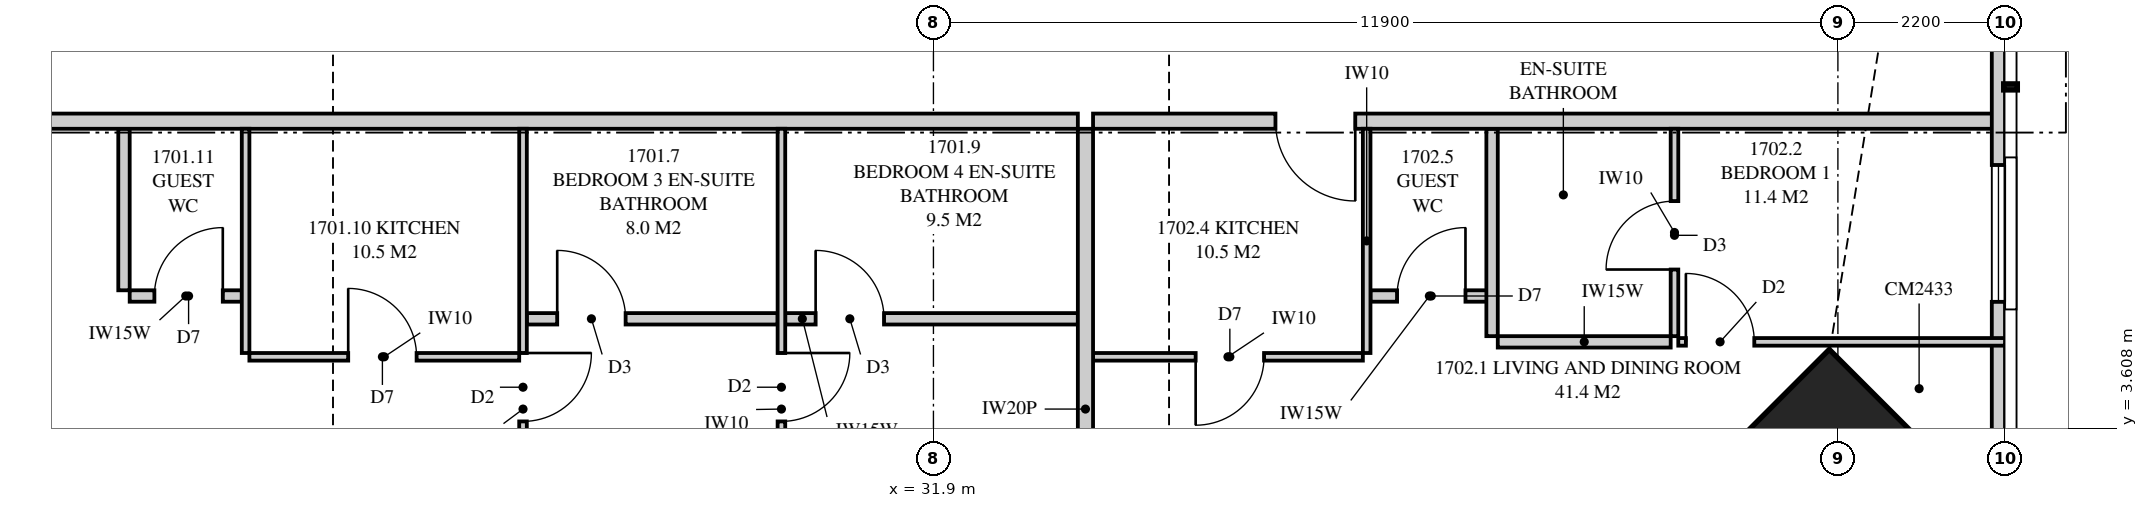
"""IFC4 building model, lengths in metres.
Left out: names, types, materials, properties, quantities, classifications, styles, units other than length and angle.
Written with IfcOpenShell. Run it as: python <this file> out.ifc"""

import sys

from ifc_helpers import new_model, si_unit, direction, frame, frame_2d, origin, origin_2d, place, context, subcontext, project, spatial, polyline, rectangle, outline, extrude, element, fill, save


model = new_model("IFC4")
c1 = context("Model", 3, precision=1e-05, world=origin(), true_north=direction((0.0, 1.0)))
c2 = subcontext(c1, "Body", "Model", "MODEL_VIEW")
j1 = project(units=[si_unit("LENGTHUNIT", "METRE"), si_unit("PLANEANGLEUNIT", "RADIAN")], contexts=[c1])
p1 = place(None, origin())
s1 = spatial("IfcSite", under=j1, at=p1, CompositionType="ELEMENT")
p2 = place(p1, origin())
s2 = spatial("IfcBuilding", under=s1, at=p2, CompositionType="ELEMENT")
p3 = place(p2, frame((0.0, 0.0, 64.55)))
s3 = spatial("IfcBuildingStorey", under=s2, at=p3, CompositionType="ELEMENT", Elevation=64.55)
p4 = place(p3, frame((43.369, 2.631, 0.0), z_axis=(0.0, 0.0, 1.0), x_axis=(-0.707106781187, 0.707106781187, 0.0)))
e1 = element("IfcColumn", 1, at=p4, inside=s3, PredefinedType="COLUMN", context=c2, shape_type="SweptSolid", body=[
    extrude(rectangle(XDim=2.4, YDim=3.3, at=origin_2d()), origin(), (0.0, 0.0, 1.0), 3.35),
])
p5 = place(p3, frame((45.913, 3.051, 0.0), z_axis=(0.0, 0.0, 1.0), x_axis=(0.0, 1.0, 0.0)))
e2 = element("IfcWall", 2, at=p5, inside=s3, PredefinedType="SOLIDWALL", context=c2, shape_type="SweptSolid", body=[
    extrude(outline(polyline([(0.0, 0.0), (31.897, 0.0), (31.897, 3.11), (22.167, 3.11), (22.167, 2.15), (22.074, 2.15), (22.074, 3.11), (21.949, 3.11), (21.949, 2.15), (9.949, 2.15), (9.949, 3.11), (9.823, 3.11), (9.823, 2.15), (9.73, 2.15), (9.73, 3.11), (0.0, 3.11), (0.0, 0.0)])), frame((0.0, 0.087, 0.0), z_axis=(0.0, -1.0, 0.0), x_axis=(1.0, 0.0, 0.0)), (0.0, 0.0, 1.0), 0.175),
])
p6 = place(p5, frame((2.222, 0.0, 0.4)))
e3 = element("IfcOpeningElement", 3, at=p6, cuts=e2, PredefinedType="OPENING", context=c2, shape_type="SweptSolid", body=[
    extrude(rectangle(XDim=1.8, YDim=1.7, at=frame_2d((0.9, 0.85))), frame((0.0, 0.097, 0.0), z_axis=(0.0, -1.0, 0.0), x_axis=(1.0, 0.0, 0.0)), (0.0, 0.0, 1.0), 0.195),
])
p7 = place(p5, frame((14.849, 0.0, 0.4)))
e4 = element("IfcOpeningElement", 4, at=p7, cuts=e2, PredefinedType="OPENING", context=c2, shape_type="SweptSolid", body=[
    extrude(rectangle(XDim=1.2, YDim=1.7, at=frame_2d((0.6, 0.85))), frame((0.0, 0.097, 0.0), z_axis=(0.0, -1.0, 0.0), x_axis=(1.0, 0.0, 0.0)), (0.0, 0.0, 1.0), 0.195),
])
p8 = place(p5, frame((27.375, 0.0, 0.4)))
e5 = element("IfcOpeningElement", 5, at=p8, cuts=e2, PredefinedType="OPENING", context=c2, shape_type="SweptSolid", body=[
    extrude(rectangle(XDim=1.8, YDim=1.7, at=frame_2d((0.9, 0.85))), frame((0.0, 0.097, 0.0), z_axis=(0.0, -1.0, 0.0), x_axis=(1.0, 0.0, 0.0)), (0.0, 0.0, 1.0), 0.195),
])
p9 = place(p3, frame((33.9, 0.175, 0.0), z_axis=(0.0, 0.0, 1.0), x_axis=(0.0, 1.0, 0.0)))
e6 = element("IfcWall", 6, at=p9, inside=s3, PredefinedType="PARTITIONING", context=c2, shape_type="SweptSolid", body=[
    extrude(outline(polyline([(0.529, 2.15), (0.0, 2.15), (0.0, 0.0), (0.529, 0.0), (0.529, 0.752), (1.021, 0.752), (1.021, 0.0), (7.375, 0.0), (7.375, 3.11), (1.685, 3.11), (1.685, 2.15), (1.021, 2.15), (1.021, 1.398), (0.529, 1.398), (0.529, 2.15)])), frame((0.0, 0.1, 0.0), z_axis=(0.0, -1.0, 0.0), x_axis=(1.0, 0.0, 0.0)), (0.0, 0.0, 1.0), 0.2),
])
p10 = place(p3, frame((17.725, 7.65, 0.0), z_axis=(0.0, 0.0, 1.0), x_axis=(1.0, 0.0, 0.0)))
e7 = element("IfcWall", 7, at=p10, inside=s3, PredefinedType="PARTITIONING", context=c2, shape_type="SweptSolid", body=[
    extrude(outline(polyline([(0.0, 0.0), (16.075, 0.0), (16.075, 3.11), (6.612, 3.11), (6.612, 2.541), (5.938, 2.541), (5.938, 3.11), (0.0, 3.11), (0.0, 0.0)])), frame((0.0, 0.1, 0.0), z_axis=(0.0, -1.0, 0.0), x_axis=(1.0, 0.0, 0.0)), (0.0, 0.0, 1.0), 0.2),
])
p11 = place(p10, frame((0.2, 0.0, 0.0)))
e8 = element("IfcOpeningElement", 8, at=p11, cuts=e7, PredefinedType="OPENING", context=c2, shape_type="SweptSolid", body=[
    extrude(rectangle(XDim=1.05, YDim=2.2, at=frame_2d((0.525, 1.1))), frame((0.0, 0.11, 0.0), z_axis=(0.0, -1.0, 0.0), x_axis=(1.0, 0.0, 0.0)), (0.0, 0.0, 1.0), 0.22),
])
p12 = place(p3, frame((26.5, 0.175, 0.0), z_axis=(0.0, 0.0, 1.0), x_axis=(0.0, 1.0, 0.0)))
e9 = element("IfcWall", 9, at=p12, inside=s3, PredefinedType="PARTITIONING", context=c2, shape_type="SweptSolid", body=[
    extrude(outline(polyline([(0.0, 0.0), (7.375, 0.0), (7.375, 3.11), (1.635, 3.11), (1.635, 2.15), (0.0, 2.15), (0.0, 3.11), (0.0, 0.0)])), frame((0.0, 0.05, 0.0), z_axis=(0.0, -1.0, 0.0), x_axis=(1.0, 0.0, 0.0)), (0.0, 0.0, 1.0), 0.1),
])
p13 = place(p12, frame((3.525, 0.0, 0.0)))
e10 = element("IfcOpeningElement", 10, at=p13, cuts=e9, PredefinedType="OPENING", context=c2, shape_type="SweptSolid", body=[
    extrude(rectangle(XDim=0.9, YDim=2.1, at=frame_2d((0.45, 1.05))), frame((0.0, 0.06, 0.0), z_axis=(0.0, -1.0, 0.0), x_axis=(1.0, 0.0, 0.0)), (0.0, 0.0, 1.0), 0.12),
])
p14 = place(p3, frame((29.9, 0.175, 0.0), z_axis=(0.0, 0.0, 1.0), x_axis=(0.0, 1.0, 0.0)))
e11 = element("IfcWall", 11, at=p14, inside=s3, PredefinedType="PARTITIONING", context=c2, shape_type="SweptSolid", body=[
    extrude(outline(polyline([(0.0, 0.0), (7.375, 0.0), (7.375, 3.11), (1.635, 3.11), (1.635, 2.15), (0.0, 2.15), (0.0, 3.11), (0.0, 0.0)])), frame((0.0, 0.05, 0.0), z_axis=(0.0, -1.0, 0.0), x_axis=(1.0, 0.0, 0.0)), (0.0, 0.0, 1.0), 0.1),
])
p15 = place(p14, frame((3.525, 0.0, 0.0)))
e12 = element("IfcOpeningElement", 12, at=p15, cuts=e11, PredefinedType="OPENING", context=c2, shape_type="SweptSolid", body=[
    extrude(rectangle(XDim=0.9, YDim=2.1, at=frame_2d((0.45, 1.05))), frame((0.0, 0.06, 0.0), z_axis=(0.0, -1.0, 0.0), x_axis=(1.0, 0.0, 0.0)), (0.0, 0.0, 1.0), 0.12),
])
p16 = place(p3, frame((26.55, 5.05, 0.0), z_axis=(0.0, 0.0, 1.0), x_axis=(1.0, 0.0, 0.0)))
e13 = element("IfcWall", 13, at=p16, inside=s3, PredefinedType="PLUMBINGWALL", context=c2, shape_type="SweptSolid", body=[
    extrude(rectangle(XDim=3.3, YDim=0.15, at=frame_2d((1.65, 0.0))), origin(), (0.0, 0.0, 1.0), 3.11),
])
p17 = place(p16, frame((0.4, 0.0, 0.0)))
e14 = element("IfcOpeningElement", 14, at=p17, cuts=e13, PredefinedType="OPENING", context=c2, shape_type="SweptSolid", body=[
    extrude(rectangle(XDim=0.9, YDim=2.1, at=frame_2d((0.45, 1.05))), frame((0.0, 0.085, 0.0), z_axis=(0.0, -1.0, 0.0), x_axis=(1.0, 0.0, 0.0)), (0.0, 0.0, 1.0), 0.17),
])
p18 = place(p3, frame((29.95, 5.05, 0.0), z_axis=(0.0, 0.0, 1.0), x_axis=(1.0, 0.0, 0.0)))
e15 = element("IfcWall", 15, at=p18, inside=s3, PredefinedType="PLUMBINGWALL", context=c2, shape_type="SweptSolid", body=[
    extrude(rectangle(XDim=3.85, YDim=0.15, at=frame_2d((1.925, 0.0))), origin(), (0.0, 0.0, 1.0), 3.11),
])
p19 = place(p18, frame((0.4, 0.0, 0.0)))
e16 = element("IfcOpeningElement", 16, at=p19, cuts=e15, PredefinedType="OPENING", context=c2, shape_type="SweptSolid", body=[
    extrude(rectangle(XDim=0.9, YDim=2.1, at=frame_2d((0.45, 1.05))), frame((0.0, 0.085, 0.0), z_axis=(0.0, -1.0, 0.0), x_axis=(1.0, 0.0, 0.0)), (0.0, 0.0, 1.0), 0.17),
])
p20 = place(p3, frame((22.9, 4.55, 0.0), z_axis=(0.0, 0.0, 1.0), x_axis=(1.0, 0.0, 0.0)))
e17 = element("IfcWall", 17, at=p20, inside=s3, PredefinedType="PARTITIONING", context=c2, shape_type="SweptSolid", body=[
    extrude(outline(polyline([(0.0, 0.0), (3.55, 0.0), (3.55, 3.11), (1.387, 3.11), (1.387, 2.541), (0.812, 2.541), (0.812, 3.11), (0.0, 3.11), (0.0, 0.0)])), frame((0.0, 0.05, 0.0), z_axis=(0.0, -1.0, 0.0), x_axis=(1.0, 0.0, 0.0)), (0.0, 0.0, 1.0), 0.1),
])
p21 = place(p20, frame((1.3, 0.0, 0.0)))
e18 = element("IfcOpeningElement", 18, at=p21, cuts=e17, PredefinedType="OPENING", context=c2, shape_type="SweptSolid", body=[
    extrude(rectangle(XDim=0.9, YDim=2.1, at=frame_2d((0.45, 1.05))), frame((0.0, 0.06, 0.0), z_axis=(0.0, -1.0, 0.0), x_axis=(1.0, 0.0, 0.0)), (0.0, 0.0, 1.0), 0.12),
])
p22 = place(p3, frame((22.85, 4.6, 0.0), z_axis=(0.0, 0.0, 1.0), x_axis=(0.0, 1.0, 0.0)))
e19 = element("IfcWall", 19, at=p22, inside=s3, PredefinedType="PARTITIONING", context=c2, shape_type="SweptSolid", body=[
    extrude(rectangle(XDim=2.95, YDim=0.1, at=frame_2d((1.475, 0.0))), origin(), (0.0, 0.0, 1.0), 3.11),
])
p23 = place(p3, frame((21.325, 5.35, 0.0), z_axis=(0.0, 0.0, 1.0), x_axis=(1.0, 0.0, 0.0)))
e20 = element("IfcWall", 20, at=p23, inside=s3, PredefinedType="PLUMBINGWALL", context=c2, shape_type="SweptSolid", body=[
    extrude(rectangle(XDim=1.475, YDim=0.15, at=frame_2d((0.738, 0.0))), origin(), (0.0, 0.0, 1.0), 3.11),
])
p24 = place(p23, frame((0.325, 0.0, 0.0)))
e21 = element("IfcOpeningElement", 21, at=p24, cuts=e20, PredefinedType="OPENING", context=c2, shape_type="SweptSolid", body=[
    extrude(rectangle(XDim=0.9, YDim=2.1, at=frame_2d((0.45, 1.05))), frame((0.0, 0.085, 0.0), z_axis=(0.0, -1.0, 0.0), x_axis=(1.0, 0.0, 0.0)), (0.0, 0.0, 1.0), 0.17),
])
p25 = place(p3, frame((21.25, 5.425, 0.0), z_axis=(0.0, 0.0, 1.0), x_axis=(0.0, 1.0, 0.0)))
e22 = element("IfcWall", 22, at=p25, inside=s3, PredefinedType="PLUMBINGWALL", context=c2, shape_type="SweptSolid", body=[
    extrude(rectangle(XDim=2.125, YDim=0.15, at=frame_2d((1.062, 0.0))), origin(), (0.0, 0.0, 1.0), 3.11),
])
p26 = place(p3, frame((34.0, 7.65, 0.0), z_axis=(0.0, 0.0, 1.0), x_axis=(1.0, 0.0, 0.0)))
e23 = element("IfcWall", 23, at=p26, inside=s3, PredefinedType="PARTITIONING", context=c2, shape_type="SweptSolid", body=[
    extrude(outline(polyline([(0.0, 0.0), (12.0, 0.0), (12.0, 3.11), (11.104, 3.11), (11.104, 2.15), (9.26, 2.15), (9.26, 3.11), (1.337, 3.11), (1.337, 2.541), (0.663, 2.541), (0.663, 3.11), (0.0, 3.11), (0.0, 0.0)])), frame((0.0, 0.1, 0.0), z_axis=(0.0, -1.0, 0.0), x_axis=(1.0, 0.0, 0.0)), (0.0, 0.0, 1.0), 0.2),
])
p27 = place(p26, frame((2.4, 0.0, 0.0)))
e24 = element("IfcOpeningElement", 24, at=p27, cuts=e23, PredefinedType="OPENING", context=c2, shape_type="SweptSolid", body=[
    extrude(rectangle(XDim=1.05, YDim=2.2, at=frame_2d((0.525, 1.1))), frame((0.0, 0.11, 0.0), z_axis=(0.0, -1.0, 0.0), x_axis=(1.0, 0.0, 0.0)), (0.0, 0.0, 1.0), 0.22),
])
p28 = place(p3, frame((41.65, 4.822, 0.0), z_axis=(0.0, 0.0, 1.0), x_axis=(0.0, 1.0, 0.0)))
e25 = element("IfcWall", 25, at=p28, inside=s3, PredefinedType="PARTITIONING", context=c2, shape_type="SweptSolid", body=[
    extrude(rectangle(XDim=2.728, YDim=0.1, at=frame_2d((1.364, 0.0))), origin(), (0.0, 0.0, 1.0), 3.11),
])
p29 = place(p28, frame((0.877, 0.0, 0.0)))
e26 = element("IfcOpeningElement", 26, at=p29, cuts=e25, PredefinedType="OPENING", context=c2, shape_type="SweptSolid", body=[
    extrude(rectangle(XDim=0.9, YDim=2.1, at=frame_2d((0.45, 1.05))), frame((0.0, 0.06, 0.0), z_axis=(0.0, -1.0, 0.0), x_axis=(1.0, 0.0, 0.0)), (0.0, 0.0, 1.0), 0.12),
])
p30 = place(p3, frame((41.7, 4.747, 0.0), z_axis=(0.0, 0.0, 1.0), x_axis=(1.0, 0.0, 0.0)))
e27 = element("IfcWall", 27, at=p30, inside=s3, PredefinedType="PARTITIONING", context=c2, shape_type="SweptSolid", body=[
    extrude(outline(polyline([(0.0, 0.0), (4.3, 0.0), (4.3, 3.11), (2.883, 3.11), (2.883, 2.15), (1.14, 2.15), (1.14, 3.11), (0.0, 3.11), (0.0, 0.0)])), frame((0.0, 0.05, 0.0), z_axis=(0.0, -1.0, 0.0), x_axis=(1.0, 0.0, 0.0)), (0.0, 0.0, 1.0), 0.1),
])
p31 = place(p30, frame((0.1, 0.0, 0.0)))
e28 = element("IfcOpeningElement", 28, at=p31, cuts=e27, PredefinedType="OPENING", context=c2, shape_type="SweptSolid", body=[
    extrude(rectangle(XDim=0.9, YDim=2.1, at=frame_2d((0.45, 1.05))), frame((0.0, 0.06, 0.0), z_axis=(0.0, -1.0, 0.0), x_axis=(1.0, 0.0, 0.0)), (0.0, 0.0, 1.0), 0.12),
])
p32 = place(p3, frame((39.325, 4.747, 0.0), z_axis=(0.0, 0.0, 1.0), x_axis=(1.0, 0.0, 0.0)))
e29 = element("IfcWall", 29, at=p32, inside=s3, PredefinedType="PLUMBINGWALL", context=c2, shape_type="SweptSolid", body=[
    extrude(rectangle(XDim=2.275, YDim=0.15, at=frame_2d((1.138, 0.0))), origin(), (0.0, 0.0, 1.0), 3.11),
])
p33 = place(p3, frame((39.25, 4.822, 0.0), z_axis=(0.0, 0.0, 1.0), x_axis=(0.0, 1.0, 0.0)))
e30 = element("IfcWall", 30, at=p33, inside=s3, PredefinedType="PLUMBINGWALL", context=c2, shape_type="SweptSolid", body=[
    extrude(rectangle(XDim=2.728, YDim=0.15, at=frame_2d((1.364, 0.0))), origin(), (0.0, 0.0, 1.0), 3.11),
])
p34 = place(p3, frame((34.0, 4.55, 0.0), z_axis=(0.0, 0.0, 1.0), x_axis=(1.0, 0.0, 0.0)))
e31 = element("IfcWall", 31, at=p34, inside=s3, PredefinedType="PARTITIONING", context=c2, shape_type="SweptSolid", body=[
    extrude(outline(polyline([(0.0, 0.0), (3.55, 0.0), (3.55, 3.11), (1.287, 3.11), (1.287, 2.541), (0.713, 2.541), (0.713, 3.11), (0.0, 3.11), (0.0, 0.0)])), frame((0.0, 0.05, 0.0), z_axis=(0.0, -1.0, 0.0), x_axis=(1.0, 0.0, 0.0)), (0.0, 0.0, 1.0), 0.1),
])
p35 = place(p34, frame((1.35, 0.0, 0.0)))
e32 = element("IfcOpeningElement", 32, at=p35, cuts=e31, PredefinedType="OPENING", context=c2, shape_type="SweptSolid", body=[
    extrude(rectangle(XDim=0.9, YDim=2.1, at=frame_2d((0.45, 1.05))), frame((0.0, 0.06, 0.0), z_axis=(0.0, -1.0, 0.0), x_axis=(1.0, 0.0, 0.0)), (0.0, 0.0, 1.0), 0.12),
])
p36 = place(p3, frame((37.6, 4.6, 0.0), z_axis=(0.0, 0.0, 1.0), x_axis=(0.0, 1.0, 0.0)))
e33 = element("IfcWall", 33, at=p36, inside=s3, PredefinedType="PARTITIONING", context=c2, shape_type="SweptSolid", body=[
    extrude(rectangle(XDim=2.95, YDim=0.1, at=frame_2d((1.475, 0.0))), origin(), (0.0, 0.0, 1.0), 3.11),
])
p37 = place(p3, frame((37.65, 5.35, 0.0), z_axis=(0.0, 0.0, 1.0), x_axis=(1.0, 0.0, 0.0)))
e34 = element("IfcWall", 34, at=p37, inside=s3, PredefinedType="PLUMBINGWALL", context=c2, shape_type="SweptSolid", body=[
    extrude(rectangle(XDim=1.55, YDim=0.15, at=frame_2d((0.775, 0.0))), origin(), (0.0, 0.0, 1.0), 3.11),
])
p38 = place(p37, frame((0.35, 0.0, 0.0)))
e35 = element("IfcOpeningElement", 35, at=p38, cuts=e34, PredefinedType="OPENING", context=c2, shape_type="SweptSolid", body=[
    extrude(rectangle(XDim=0.9, YDim=2.1, at=frame_2d((0.45, 1.05))), frame((0.0, 0.085, 0.0), z_axis=(0.0, -1.0, 0.0), x_axis=(1.0, 0.0, 0.0)), (0.0, 0.0, 1.0), 0.17),
])
p39 = place(p6, origin())
e36 = element("IfcWindow", 36, at=p39, inside=s3, PartitioningType="SINGLE_PANEL", PredefinedType="WINDOW", context=c2, shape_type="SweptSolid", body=[
    extrude(rectangle(XDim=1.8, YDim=1.7, at=frame_2d((0.9, 0.85))), frame((0.0, 0.03, 0.0), z_axis=(0.0, -1.0, 0.0), x_axis=(1.0, 0.0, 0.0)), (0.0, 0.0, 1.0), 0.06),
])
fill(e3, e36)
p40 = place(p13, frame((0.9, 0.0, 0.0), z_axis=(0.0, 0.0, 1.0), x_axis=(-1.0, 0.0, 0.0)))
e37 = element("IfcDoor", 37, at=p40, inside=s3, OperationType="SINGLE_SWING_LEFT", PredefinedType="DOOR", context=c2, shape_type="SweptSolid", body=[
    extrude(rectangle(XDim=0.9, YDim=2.1, at=frame_2d((0.45, 1.05))), frame((0.0, 0.025, 0.0), z_axis=(0.0, -1.0, 0.0), x_axis=(1.0, 0.0, 0.0)), (0.0, 0.0, 1.0), 0.05),
])
fill(e10, e37)
p41 = place(p17, origin())
e38 = element("IfcDoor", 38, at=p41, inside=s3, OperationType="SINGLE_SWING_LEFT", PredefinedType="DOOR", context=c2, shape_type="SweptSolid", body=[
    extrude(rectangle(XDim=0.9, YDim=2.1, at=frame_2d((0.45, 1.05))), frame((0.0, 0.025, 0.0), z_axis=(0.0, -1.0, 0.0), x_axis=(1.0, 0.0, 0.0)), (0.0, 0.0, 1.0), 0.05),
])
fill(e14, e38)
p42 = place(p15, frame((0.9, 0.0, 0.0), z_axis=(0.0, 0.0, 1.0), x_axis=(-1.0, 0.0, 0.0)))
e39 = element("IfcDoor", 39, at=p42, inside=s3, OperationType="SINGLE_SWING_LEFT", PredefinedType="DOOR", context=c2, shape_type="SweptSolid", body=[
    extrude(rectangle(XDim=0.9, YDim=2.1, at=frame_2d((0.45, 1.05))), frame((0.0, 0.025, 0.0), z_axis=(0.0, -1.0, 0.0), x_axis=(1.0, 0.0, 0.0)), (0.0, 0.0, 1.0), 0.05),
])
fill(e12, e39)
p43 = place(p19, origin())
e40 = element("IfcDoor", 40, at=p43, inside=s3, OperationType="SINGLE_SWING_LEFT", PredefinedType="DOOR", context=c2, shape_type="SweptSolid", body=[
    extrude(rectangle(XDim=0.9, YDim=2.1, at=frame_2d((0.45, 1.05))), frame((0.0, 0.025, 0.0), z_axis=(0.0, -1.0, 0.0), x_axis=(1.0, 0.0, 0.0)), (0.0, 0.0, 1.0), 0.05),
])
fill(e16, e40)
p44 = place(p21, origin())
e41 = element("IfcDoor", 41, at=p44, inside=s3, OperationType="SINGLE_SWING_LEFT", PredefinedType="DOOR", context=c2, shape_type="SweptSolid", body=[
    extrude(rectangle(XDim=0.9, YDim=2.1, at=frame_2d((0.45, 1.05))), frame((0.0, 0.025, 0.0), z_axis=(0.0, -1.0, 0.0), x_axis=(1.0, 0.0, 0.0)), (0.0, 0.0, 1.0), 0.05),
])
fill(e18, e41)
p45 = place(p24, origin())
e42 = element("IfcDoor", 42, at=p45, inside=s3, OperationType="SINGLE_SWING_RIGHT", PredefinedType="DOOR", context=c2, shape_type="SweptSolid", body=[
    extrude(rectangle(XDim=0.9, YDim=2.1, at=frame_2d((0.45, 1.05))), frame((0.0, 0.025, 0.0), z_axis=(0.0, -1.0, 0.0), x_axis=(1.0, 0.0, 0.0)), (0.0, 0.0, 1.0), 0.05),
])
fill(e21, e42)
p46 = place(p27, frame((1.05, 0.0, 0.0), z_axis=(0.0, 0.0, 1.0), x_axis=(-1.0, 0.0, 0.0)))
e43 = element("IfcDoor", 43, at=p46, inside=s3, OperationType="SINGLE_SWING_LEFT", PredefinedType="DOOR", context=c2, shape_type="SweptSolid", body=[
    extrude(rectangle(XDim=1.05, YDim=2.2, at=frame_2d((0.525, 1.1))), frame((0.0, 0.025, 0.0), z_axis=(0.0, -1.0, 0.0), x_axis=(1.0, 0.0, 0.0)), (0.0, 0.0, 1.0), 0.05),
])
fill(e24, e43)
p47 = place(p31, origin())
e44 = element("IfcDoor", 44, at=p47, inside=s3, OperationType="SINGLE_SWING_LEFT", PredefinedType="DOOR", context=c2, shape_type="SweptSolid", body=[
    extrude(rectangle(XDim=0.9, YDim=2.1, at=frame_2d((0.45, 1.05))), frame((0.0, 0.025, 0.0), z_axis=(0.0, -1.0, 0.0), x_axis=(1.0, 0.0, 0.0)), (0.0, 0.0, 1.0), 0.05),
])
fill(e28, e44)
p48 = place(p29, origin())
e45 = element("IfcDoor", 45, at=p48, inside=s3, OperationType="SINGLE_SWING_LEFT", PredefinedType="DOOR", context=c2, shape_type="SweptSolid", body=[
    extrude(rectangle(XDim=0.9, YDim=2.1, at=frame_2d((0.45, 1.05))), frame((0.0, 0.025, 0.0), z_axis=(0.0, -1.0, 0.0), x_axis=(1.0, 0.0, 0.0)), (0.0, 0.0, 1.0), 0.05),
])
fill(e26, e45)
p49 = place(p35, frame((0.9, 0.0, 0.0), z_axis=(0.0, 0.0, 1.0), x_axis=(-1.0, 0.0, 0.0)))
e46 = element("IfcDoor", 46, at=p49, inside=s3, OperationType="SINGLE_SWING_RIGHT", PredefinedType="DOOR", context=c2, shape_type="SweptSolid", body=[
    extrude(rectangle(XDim=0.9, YDim=2.1, at=frame_2d((0.45, 1.05))), frame((0.0, 0.025, 0.0), z_axis=(0.0, -1.0, 0.0), x_axis=(1.0, 0.0, 0.0)), (0.0, 0.0, 1.0), 0.05),
])
fill(e32, e46)
p50 = place(p38, origin())
e47 = element("IfcDoor", 47, at=p50, inside=s3, OperationType="SINGLE_SWING_RIGHT", PredefinedType="DOOR", context=c2, shape_type="SweptSolid", body=[
    extrude(rectangle(XDim=0.9, YDim=2.1, at=frame_2d((0.45, 1.05))), frame((0.0, 0.025, 0.0), z_axis=(0.0, -1.0, 0.0), x_axis=(1.0, 0.0, 0.0)), (0.0, 0.0, 1.0), 0.05),
])
fill(e35, e47)
save(model, sys.argv[1])
